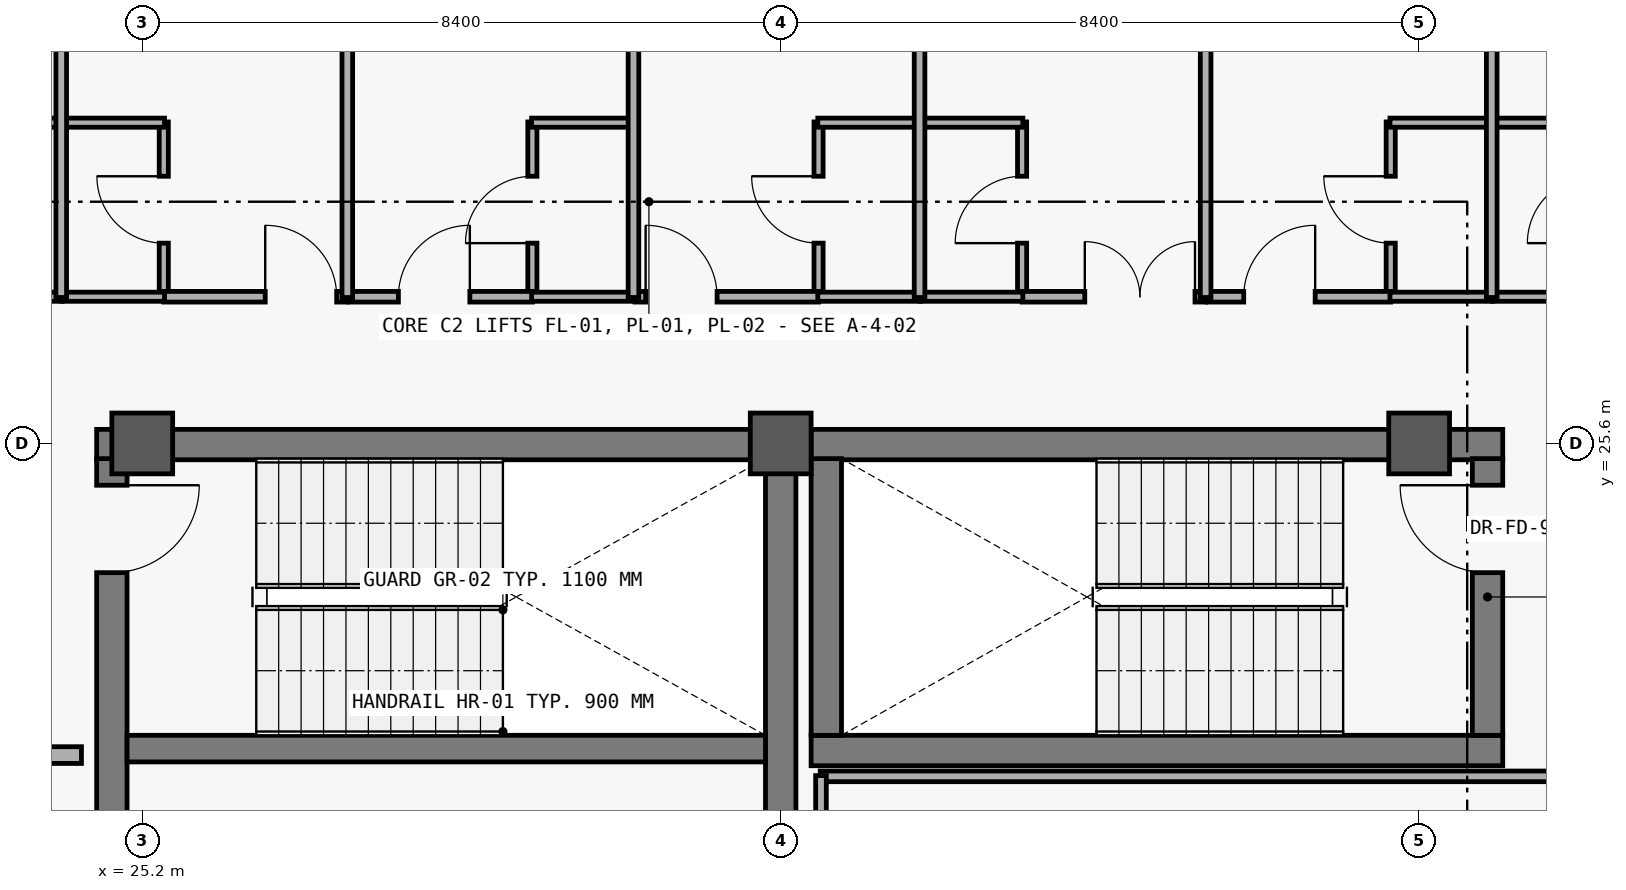
"""IFC4 building model, lengths in metres.
Left out: names, types, materials, properties, quantities, classifications, styles, units other than length and angle.
Written with IfcOpenShell. Run it as: python <this file> out.ifc"""

import sys

from ifc_helpers import new_model, si_unit, direction, frame, frame_2d, origin, origin_2d, place, context, subcontext, project, spatial, rectangle, extrude, element, fill, save


model = new_model("IFC4")
c1 = context("Model", 3, precision=1e-05, world=origin(), true_north=direction((0.0, 1.0)))
c2 = subcontext(c1, "Body", "Model", "MODEL_VIEW")
j1 = project(units=[si_unit("LENGTHUNIT", "METRE"), si_unit("PLANEANGLEUNIT", "RADIAN")], contexts=[c1])
p1 = place(None, origin())
s1 = spatial("IfcSite", under=j1, at=p1, CompositionType="ELEMENT")
p2 = place(p1, origin())
s2 = spatial("IfcBuilding", under=s1, at=p2, CompositionType="ELEMENT")
p3 = place(p2, frame((0.0, 0.0, 10.8)))
s3 = spatial("IfcBuildingStorey", under=s2, at=p3, CompositionType="ELEMENT", Elevation=10.8)
for number, where, z_axis, x_axis in (
    (1, (25.2, 25.6, 0.0), (0.0, 0.0, 1.0), (1.0, 0.0, 0.0)),
    (2, (33.6, 25.6, 0.0), (0.0, 0.0, 1.0), (1.0, 0.0, 0.0)),
    (3, (42.0, 25.6, 0.0), (0.0, 0.0, 1.0), (1.0, 0.0, 0.0)),
):
    element("IfcColumn", number, at=place(p3, frame(where, z_axis=z_axis, x_axis=x_axis)), inside=s3, PredefinedType="COLUMN", context=c2, shape_type="SweptSolid", body=[
        extrude(rectangle(XDim=0.8, YDim=0.8, at=origin_2d()), origin(), (0.0, 0.0, 1.0), 4.2),
    ])
p4 = place(p3, frame((33.8, 25.585, 0.0), z_axis=(0.0, 0.0, 1.0), x_axis=(-1.0, 0.0, 0.0)))
e4 = element("IfcWall", 4, at=p4, inside=s3, PredefinedType="SHEAR", context=c2, shape_type="SweptSolid", body=[
    extrude(rectangle(XDim=9.2, YDim=0.4, at=frame_2d((4.6, 0.0))), origin(), (0.0, 0.0, 1.0), 3.92),
])
p5 = place(p3, frame((24.8, 25.4, 0.0), z_axis=(0.0, 0.0, 1.0), x_axis=(0.0, -1.0, 0.0)))
e5 = element("IfcWall", 5, at=p5, inside=s3, PredefinedType="SHEAR", context=c2, shape_type="SweptSolid", body=[
    extrude(rectangle(XDim=7.4, YDim=0.4, at=frame_2d((3.7, 0.0))), origin(), (0.0, 0.0, 1.0), 3.92),
])
p6 = place(p5, frame((0.35, 0.0, 0.0)))
e6 = element("IfcOpeningElement", 6, at=p6, cuts=e5, PredefinedType="OPENING", context=c2, shape_type="SweptSolid", body=[
    extrude(rectangle(XDim=1.15, YDim=2.2, at=frame_2d((0.575, 1.1))), frame((0.0, 0.21, 0.0), z_axis=(0.0, -1.0, 0.0), x_axis=(1.0, 0.0, 0.0)), (0.0, 0.0, 1.0), 0.42),
])
p7 = place(p3, frame((33.6, 18.0, 0.0), z_axis=(0.0, 0.0, 1.0), x_axis=(0.0, 1.0, 0.0)))
e7 = element("IfcWall", 7, at=p7, inside=s3, PredefinedType="SHEAR", context=c2, shape_type="SweptSolid", body=[
    extrude(rectangle(XDim=7.4, YDim=0.4, at=frame_2d((3.7, 0.0))), origin(), (0.0, 0.0, 1.0), 3.92),
])
p8 = place(p3, frame((25.0, 21.585, 0.0), z_axis=(0.0, 0.0, 1.0), x_axis=(1.0, 0.0, 0.0)))
e8 = element("IfcWall", 8, at=p8, inside=s3, PredefinedType="SHEAR", context=c2, shape_type="SweptSolid", body=[
    extrude(rectangle(XDim=8.4, YDim=0.35, at=frame_2d((4.2, 0.0))), origin(), (0.0, 0.0, 1.0), 3.92),
])
p9 = place(p3, frame((19.6, 21.5, 0.0), z_axis=(0.0, 0.0, 1.0), x_axis=(1.0, 0.0, 0.0)))
e9 = element("IfcWall", 9, at=p9, inside=s3, PredefinedType="SOLIDWALL", context=c2, shape_type="SweptSolid", body=[
    extrude(rectangle(XDim=4.8, YDim=0.22, at=frame_2d((2.4, 0.0))), origin(), (0.0, 0.0, 1.0), 3.07),
])
p10 = place(p9, frame((2.05, 0.0, 0.0)))
e10 = element("IfcOpeningElement", 10, at=p10, cuts=e9, PredefinedType="OPENING", context=c2, shape_type="SweptSolid", body=[
    extrude(rectangle(XDim=1.25, YDim=2.2, at=frame_2d((0.625, 1.1))), frame((0.0, 0.12, 0.0), z_axis=(0.0, -1.0, 0.0), x_axis=(1.0, 0.0, 0.0)), (0.0, 0.0, 1.0), 0.24),
])
for number, where, z_axis, x_axis in (
    (11, (34.0, 21.56, 0.0), (0.0, 0.0, 1.0), (1.0, 0.0, 0.0)),
    (12, (43.1, 25.585, 0.0), (0.0, 0.0, 1.0), (-1.0, 0.0, 0.0)),
):
    element("IfcWall", number, at=place(p3, frame(where, z_axis=z_axis, x_axis=x_axis)), inside=s3, PredefinedType="SHEAR", context=c2, shape_type="SweptSolid", body=[
        extrude(rectangle(XDim=9.1, YDim=0.4, at=frame_2d((4.55, 0.0))), origin(), (0.0, 0.0, 1.0), 3.92),
    ])
p11 = place(p3, frame((34.2, 25.4, 0.0), z_axis=(0.0, 0.0, 1.0), x_axis=(0.0, -1.0, 0.0)))
e13 = element("IfcWall", 13, at=p11, inside=s3, PredefinedType="SHEAR", context=c2, shape_type="SweptSolid", body=[
    extrude(rectangle(XDim=3.64, YDim=0.4, at=frame_2d((1.82, 0.0))), origin(), (0.0, 0.0, 1.0), 3.92),
])
p12 = place(p3, frame((42.9, 21.76, 0.0), z_axis=(0.0, 0.0, 1.0), x_axis=(0.0, 1.0, 0.0)))
e14 = element("IfcWall", 14, at=p12, inside=s3, PredefinedType="SHEAR", context=c2, shape_type="SweptSolid", body=[
    extrude(rectangle(XDim=3.64, YDim=0.4, at=frame_2d((1.82, 0.0))), origin(), (0.0, 0.0, 1.0), 3.92),
])
p13 = place(p12, frame((2.14, 0.0, 0.0)))
e15 = element("IfcOpeningElement", 15, at=p13, cuts=e14, PredefinedType="OPENING", context=c2, shape_type="SweptSolid", body=[
    extrude(rectangle(XDim=1.15, YDim=2.2, at=frame_2d((0.575, 1.1))), frame((0.0, 0.21, 0.0), z_axis=(0.0, -1.0, 0.0), x_axis=(1.0, 0.0, 0.0)), (0.0, 0.0, 1.0), 0.42),
])
p14 = place(p3, frame((25.483, 27.52, 0.0), z_axis=(0.0, 0.0, 1.0), x_axis=(0.0, 1.0, 0.0)))
e16 = element("IfcWall", 16, at=p14, inside=s3, PredefinedType="PARTITIONING", context=c2, shape_type="SweptSolid", body=[
    extrude(rectangle(XDim=2.31, YDim=0.12, at=frame_2d((1.155, 0.0))), origin(), (0.0, 0.0, 1.0), 3.02),
])
p15 = place(p14, frame((0.715, 0.0, 0.0)))
e17 = element("IfcOpeningElement", 17, at=p15, cuts=e16, PredefinedType="OPENING", context=c2, shape_type="SweptSolid", body=[
    extrude(rectangle(XDim=0.88, YDim=2.15, at=frame_2d((0.44, 1.075))), frame((0.0, 0.07, 0.0), z_axis=(0.0, -1.0, 0.0), x_axis=(1.0, 0.0, 0.0)), (0.0, 0.0, 1.0), 0.14),
])
p16 = place(p3, frame((30.333, 27.52, 0.0), z_axis=(0.0, 0.0, 1.0), x_axis=(0.0, 1.0, 0.0)))
e18 = element("IfcWall", 18, at=p16, inside=s3, PredefinedType="PARTITIONING", context=c2, shape_type="SweptSolid", body=[
    extrude(rectangle(XDim=2.31, YDim=0.12, at=frame_2d((1.155, 0.0))), origin(), (0.0, 0.0, 1.0), 3.02),
])
p17 = place(p16, frame((0.715, 0.0, 0.0)))
e19 = element("IfcOpeningElement", 19, at=p17, cuts=e18, PredefinedType="OPENING", context=c2, shape_type="SweptSolid", body=[
    extrude(rectangle(XDim=0.88, YDim=2.15, at=frame_2d((0.44, 1.075))), frame((0.0, 0.07, 0.0), z_axis=(0.0, -1.0, 0.0), x_axis=(1.0, 0.0, 0.0)), (0.0, 0.0, 1.0), 0.14),
])
p18 = place(p3, frame((34.098, 27.52, 0.0), z_axis=(0.0, 0.0, 1.0), x_axis=(0.0, 1.0, 0.0)))
e20 = element("IfcWall", 20, at=p18, inside=s3, PredefinedType="PARTITIONING", context=c2, shape_type="SweptSolid", body=[
    extrude(rectangle(XDim=2.31, YDim=0.12, at=frame_2d((1.155, 0.0))), origin(), (0.0, 0.0, 1.0), 3.02),
])
p19 = place(p18, frame((0.715, 0.0, 0.0)))
e21 = element("IfcOpeningElement", 21, at=p19, cuts=e20, PredefinedType="OPENING", context=c2, shape_type="SweptSolid", body=[
    extrude(rectangle(XDim=0.88, YDim=2.15, at=frame_2d((0.44, 1.075))), frame((0.0, 0.07, 0.0), z_axis=(0.0, -1.0, 0.0), x_axis=(1.0, 0.0, 0.0)), (0.0, 0.0, 1.0), 0.14),
])
p20 = place(p3, frame((36.776, 27.52, 0.0), z_axis=(0.0, 0.0, 1.0), x_axis=(0.0, 1.0, 0.0)))
e22 = element("IfcWall", 22, at=p20, inside=s3, PredefinedType="PARTITIONING", context=c2, shape_type="SweptSolid", body=[
    extrude(rectangle(XDim=2.31, YDim=0.12, at=frame_2d((1.155, 0.0))), origin(), (0.0, 0.0, 1.0), 3.02),
])
p21 = place(p20, frame((0.715, 0.0, 0.0)))
e23 = element("IfcOpeningElement", 23, at=p21, cuts=e22, PredefinedType="OPENING", context=c2, shape_type="SweptSolid", body=[
    extrude(rectangle(XDim=0.88, YDim=2.15, at=frame_2d((0.44, 1.075))), frame((0.0, 0.07, 0.0), z_axis=(0.0, -1.0, 0.0), x_axis=(1.0, 0.0, 0.0)), (0.0, 0.0, 1.0), 0.14),
])
p22 = place(p3, frame((41.626, 27.52, 0.0), z_axis=(0.0, 0.0, 1.0), x_axis=(0.0, 1.0, 0.0)))
e24 = element("IfcWall", 24, at=p22, inside=s3, PredefinedType="PARTITIONING", context=c2, shape_type="SweptSolid", body=[
    extrude(rectangle(XDim=2.31, YDim=0.12, at=frame_2d((1.155, 0.0))), origin(), (0.0, 0.0, 1.0), 3.02),
])
p23 = place(p22, frame((0.715, 0.0, 0.0)))
e25 = element("IfcOpeningElement", 25, at=p23, cuts=e24, PredefinedType="OPENING", context=c2, shape_type="SweptSolid", body=[
    extrude(rectangle(XDim=0.88, YDim=2.15, at=frame_2d((0.44, 1.075))), frame((0.0, 0.07, 0.0), z_axis=(0.0, -1.0, 0.0), x_axis=(1.0, 0.0, 0.0)), (0.0, 0.0, 1.0), 0.14),
])
p24 = place(p3, frame((25.483, 27.53, 0.0), z_axis=(0.0, 0.0, 1.0), x_axis=(1.0, 0.0, 0.0)))
e26 = element("IfcWall", 26, at=p24, inside=s3, PredefinedType="PARTITIONING", context=c2, shape_type="SweptSolid", body=[
    extrude(rectangle(XDim=2.415, YDim=0.14, at=frame_2d((1.208, 0.0))), origin(), (0.0, 0.0, 1.0), 3.02),
])
p25 = place(p24, frame((1.335, 0.0, 0.0)))
e27 = element("IfcOpeningElement", 27, at=p25, cuts=e26, PredefinedType="OPENING", context=c2, shape_type="SweptSolid", body=[
    extrude(rectangle(XDim=0.94, YDim=2.2, at=frame_2d((0.47, 1.1))), frame((0.0, 0.08, 0.0), z_axis=(0.0, -1.0, 0.0), x_axis=(1.0, 0.0, 0.0)), (0.0, 0.0, 1.0), 0.16),
])
p26 = place(p3, frame((27.918, 27.53, 0.0), z_axis=(0.0, 0.0, 1.0), x_axis=(1.0, 0.0, 0.0)))
e28 = element("IfcWall", 28, at=p26, inside=s3, PredefinedType="PARTITIONING", context=c2, shape_type="SweptSolid", body=[
    extrude(rectangle(XDim=2.415, YDim=0.14, at=frame_2d((1.208, 0.0))), origin(), (0.0, 0.0, 1.0), 3.02),
])
p27 = place(p26, frame((0.652, 0.0, 0.0)))
e29 = element("IfcOpeningElement", 29, at=p27, cuts=e28, PredefinedType="OPENING", context=c2, shape_type="SweptSolid", body=[
    extrude(rectangle(XDim=0.94, YDim=2.2, at=frame_2d((0.47, 1.1))), frame((0.0, 0.08, 0.0), z_axis=(0.0, -1.0, 0.0), x_axis=(1.0, 0.0, 0.0)), (0.0, 0.0, 1.0), 0.16),
])
p28 = place(p3, frame((31.683, 27.53, 0.0), z_axis=(0.0, 0.0, 1.0), x_axis=(1.0, 0.0, 0.0)))
e30 = element("IfcWall", 30, at=p28, inside=s3, PredefinedType="PARTITIONING", context=c2, shape_type="SweptSolid", body=[
    extrude(rectangle(XDim=2.415, YDim=0.14, at=frame_2d((1.208, 0.0))), origin(), (0.0, 0.0, 1.0), 3.02),
])
p29 = place(p28, frame((0.14, 0.0, 0.0)))
e31 = element("IfcOpeningElement", 31, at=p29, cuts=e30, PredefinedType="OPENING", context=c2, shape_type="SweptSolid", body=[
    extrude(rectangle(XDim=0.94, YDim=2.2, at=frame_2d((0.47, 1.1))), frame((0.0, 0.08, 0.0), z_axis=(0.0, -1.0, 0.0), x_axis=(1.0, 0.0, 0.0)), (0.0, 0.0, 1.0), 0.16),
])
p30 = place(p3, frame((36.776, 27.53, 0.0), z_axis=(0.0, 0.0, 1.0), x_axis=(1.0, 0.0, 0.0)))
e32 = element("IfcWall", 32, at=p30, inside=s3, PredefinedType="PARTITIONING", context=c2, shape_type="SweptSolid", body=[
    extrude(rectangle(XDim=2.415, YDim=0.14, at=frame_2d((1.208, 0.0))), origin(), (0.0, 0.0, 1.0), 3.02),
])
p31 = place(p30, frame((0.825, 0.0, 0.0)))
e33 = element("IfcOpeningElement", 33, at=p31, cuts=e32, PredefinedType="OPENING", context=c2, shape_type="SweptSolid", body=[
    extrude(rectangle(XDim=1.45, YDim=2.3, at=frame_2d((0.725, 1.15))), frame((0.0, 0.08, 0.0), z_axis=(0.0, -1.0, 0.0), x_axis=(1.0, 0.0, 0.0)), (0.0, 0.0, 1.0), 0.16),
])
p32 = place(p3, frame((39.211, 27.53, 0.0), z_axis=(0.0, 0.0, 1.0), x_axis=(1.0, 0.0, 0.0)))
e34 = element("IfcWall", 34, at=p32, inside=s3, PredefinedType="PARTITIONING", context=c2, shape_type="SweptSolid", body=[
    extrude(rectangle(XDim=2.415, YDim=0.14, at=frame_2d((1.208, 0.0))), origin(), (0.0, 0.0, 1.0), 3.02),
])
p33 = place(p32, frame((0.481, 0.0, 0.0)))
e35 = element("IfcOpeningElement", 35, at=p33, cuts=e34, PredefinedType="OPENING", context=c2, shape_type="SweptSolid", body=[
    extrude(rectangle(XDim=0.94, YDim=2.2, at=frame_2d((0.47, 1.1))), frame((0.0, 0.08, 0.0), z_axis=(0.0, -1.0, 0.0), x_axis=(1.0, 0.0, 0.0)), (0.0, 0.0, 1.0), 0.16),
])
for number, where, z_axis, x_axis in (
    (36, (22.795, 27.53, 0.0), (0.0, 0.0, 1.0), (1.0, 0.0, 0.0)),
    (37, (22.795, 29.82, 0.0), (0.0, 0.0, 1.0), (1.0, 0.0, 0.0)),
):
    element("IfcWall", number, at=place(p3, frame(where, z_axis=z_axis, x_axis=x_axis)), inside=s3, PredefinedType="PARTITIONING", context=c2, shape_type="SweptSolid", body=[
        extrude(rectangle(XDim=1.349, YDim=0.12, at=frame_2d((0.675, 0.0))), origin(), (0.0, 0.0, 1.0), 3.02),
    ])
for number, where, z_axis, x_axis in (
    (38, (24.144, 27.53, 0.0), (0.0, 0.0, 1.0), (1.0, 0.0, 0.0)),
    (39, (24.144, 29.82, 0.0), (0.0, 0.0, 1.0), (1.0, 0.0, 0.0)),
):
    element("IfcWall", number, at=place(p3, frame(where, z_axis=z_axis, x_axis=x_axis)), inside=s3, PredefinedType="PARTITIONING", context=c2, shape_type="SweptSolid", body=[
        extrude(rectangle(XDim=1.349, YDim=0.12, at=frame_2d((0.674, 0.0))), origin(), (0.0, 0.0, 1.0), 3.02),
    ])
for number, where, z_axis, x_axis in (
    (40, (30.323, 27.53, 0.0), (0.0, 0.0, 1.0), (1.0, 0.0, 0.0)),
    (41, (30.323, 29.82, 0.0), (0.0, 0.0, 1.0), (1.0, 0.0, 0.0)),
):
    element("IfcWall", number, at=place(p3, frame(where, z_axis=z_axis, x_axis=x_axis)), inside=s3, PredefinedType="PARTITIONING", context=c2, shape_type="SweptSolid", body=[
        extrude(rectangle(XDim=1.35, YDim=0.12, at=frame_2d((0.675, 0.0))), origin(), (0.0, 0.0, 1.0), 3.02),
    ])
for number, where, z_axis, x_axis in (
    (42, (34.088, 27.53, 0.0), (0.0, 0.0, 1.0), (1.0, 0.0, 0.0)),
    (43, (34.088, 29.82, 0.0), (0.0, 0.0, 1.0), (1.0, 0.0, 0.0)),
):
    element("IfcWall", number, at=place(p3, frame(where, z_axis=z_axis, x_axis=x_axis)), inside=s3, PredefinedType="PARTITIONING", context=c2, shape_type="SweptSolid", body=[
        extrude(rectangle(XDim=1.349, YDim=0.12, at=frame_2d((0.675, 0.0))), origin(), (0.0, 0.0, 1.0), 3.02),
    ])
for number, where, z_axis, x_axis in (
    (44, (35.437, 27.53, 0.0), (0.0, 0.0, 1.0), (1.0, 0.0, 0.0)),
    (45, (35.437, 29.82, 0.0), (0.0, 0.0, 1.0), (1.0, 0.0, 0.0)),
):
    element("IfcWall", number, at=place(p3, frame(where, z_axis=z_axis, x_axis=x_axis)), inside=s3, PredefinedType="PARTITIONING", context=c2, shape_type="SweptSolid", body=[
        extrude(rectangle(XDim=1.349, YDim=0.12, at=frame_2d((0.674, 0.0))), origin(), (0.0, 0.0, 1.0), 3.02),
    ])
for number, where, z_axis, x_axis in (
    (46, (41.616, 27.53, 0.0), (0.0, 0.0, 1.0), (1.0, 0.0, 0.0)),
    (47, (41.616, 29.82, 0.0), (0.0, 0.0, 1.0), (1.0, 0.0, 0.0)),
):
    element("IfcWall", number, at=place(p3, frame(where, z_axis=z_axis, x_axis=x_axis)), inside=s3, PredefinedType="PARTITIONING", context=c2, shape_type="SweptSolid", body=[
        extrude(rectangle(XDim=1.349, YDim=0.12, at=frame_2d((0.675, 0.0))), origin(), (0.0, 0.0, 1.0), 3.02),
    ])
for number, where, z_axis, x_axis in (
    (48, (42.965, 27.53, 0.0), (0.0, 0.0, 1.0), (1.0, 0.0, 0.0)),
    (49, (42.965, 29.82, 0.0), (0.0, 0.0, 1.0), (1.0, 0.0, 0.0)),
):
    element("IfcWall", number, at=place(p3, frame(where, z_axis=z_axis, x_axis=x_axis)), inside=s3, PredefinedType="PARTITIONING", context=c2, shape_type="SweptSolid", body=[
        extrude(rectangle(XDim=1.349, YDim=0.12, at=frame_2d((0.674, 0.0))), origin(), (0.0, 0.0, 1.0), 3.02),
    ])
p34 = place(p3, frame((34.12, 21.22, 0.0), z_axis=(0.0, 0.0, 1.0), x_axis=(1.0, 0.0, 0.0)))
e50 = element("IfcWall", 50, at=p34, inside=s3, PredefinedType="PARTITIONING", context=c2, shape_type="SweptSolid", body=[
    extrude(rectangle(XDim=10.76, YDim=0.14, at=frame_2d((5.38, 0.0))), origin(), (0.0, 0.0, 1.0), 3.02),
])
p35 = place(p3, frame((34.13, 17.77, 0.0), z_axis=(0.0, 0.0, 1.0), x_axis=(0.0, 1.0, 0.0)))
e51 = element("IfcWall", 51, at=p35, inside=s3, PredefinedType="PARTITIONING", context=c2, shape_type="SweptSolid", body=[
    extrude(rectangle(XDim=3.46, YDim=0.14, at=frame_2d((1.73, 0.0))), origin(), (0.0, 0.0, 1.0), 3.02),
])
for number, where, z_axis, x_axis in (
    (52, (24.134, 27.52, 0.0), (0.0, 0.0, 1.0), (0.0, 1.0, 0.0)),
    (53, (27.898, 27.52, 0.0), (0.0, 0.0, 1.0), (0.0, 1.0, 0.0)),
    (54, (31.663, 27.52, 0.0), (0.0, 0.0, 1.0), (0.0, 1.0, 0.0)),
    (55, (35.427, 27.52, 0.0), (0.0, 0.0, 1.0), (0.0, 1.0, 0.0)),
    (56, (39.191, 27.52, 0.0), (0.0, 0.0, 1.0), (0.0, 1.0, 0.0)),
    (57, (42.955, 27.52, 0.0), (0.0, 0.0, 1.0), (0.0, 1.0, 0.0)),
):
    element("IfcWall", number, at=place(p3, frame(where, z_axis=z_axis, x_axis=x_axis)), inside=s3, PredefinedType="PARTITIONING", context=c2, shape_type="SweptSolid", body=[
        extrude(rectangle(XDim=6.2, YDim=0.14, at=frame_2d((3.1, 0.0))), origin(), (0.0, 0.0, 1.0), 3.02),
    ])
p36 = place(p6, origin())
e58 = element("IfcDoor", 58, at=p36, inside=s3, OperationType="SINGLE_SWING_LEFT", PredefinedType="DOOR", context=c2, shape_type="SweptSolid", body=[
    extrude(rectangle(XDim=1.15, YDim=2.2, at=frame_2d((0.575, 1.1))), frame((0.0, 0.025, 0.0), z_axis=(0.0, -1.0, 0.0), x_axis=(1.0, 0.0, 0.0)), (0.0, 0.0, 1.0), 0.05),
])
fill(e6, e58)
p37 = place(p13, origin())
e59 = element("IfcDoor", 59, at=p37, inside=s3, OperationType="SINGLE_SWING_RIGHT", PredefinedType="DOOR", context=c2, shape_type="SweptSolid", body=[
    extrude(rectangle(XDim=1.15, YDim=2.2, at=frame_2d((0.575, 1.1))), frame((0.0, 0.025, 0.0), z_axis=(0.0, -1.0, 0.0), x_axis=(1.0, 0.0, 0.0)), (0.0, 0.0, 1.0), 0.05),
])
fill(e15, e59)
p38 = place(p15, origin())
e60 = element("IfcDoor", 60, at=p38, inside=s3, OperationType="SINGLE_SWING_RIGHT", PredefinedType="DOOR", context=c2, shape_type="SweptSolid", body=[
    extrude(rectangle(XDim=0.88, YDim=2.15, at=frame_2d((0.44, 1.075))), frame((0.0, 0.025, 0.0), z_axis=(0.0, -1.0, 0.0), x_axis=(1.0, 0.0, 0.0)), (0.0, 0.0, 1.0), 0.05),
])
fill(e17, e60)
p39 = place(p17, origin())
e61 = element("IfcDoor", 61, at=p39, inside=s3, OperationType="SINGLE_SWING_LEFT", PredefinedType="DOOR", context=c2, shape_type="SweptSolid", body=[
    extrude(rectangle(XDim=0.88, YDim=2.15, at=frame_2d((0.44, 1.075))), frame((0.0, 0.025, 0.0), z_axis=(0.0, -1.0, 0.0), x_axis=(1.0, 0.0, 0.0)), (0.0, 0.0, 1.0), 0.05),
])
fill(e19, e61)
p40 = place(p19, origin())
e62 = element("IfcDoor", 62, at=p40, inside=s3, OperationType="SINGLE_SWING_RIGHT", PredefinedType="DOOR", context=c2, shape_type="SweptSolid", body=[
    extrude(rectangle(XDim=0.88, YDim=2.15, at=frame_2d((0.44, 1.075))), frame((0.0, 0.025, 0.0), z_axis=(0.0, -1.0, 0.0), x_axis=(1.0, 0.0, 0.0)), (0.0, 0.0, 1.0), 0.05),
])
fill(e21, e62)
p41 = place(p21, origin())
e63 = element("IfcDoor", 63, at=p41, inside=s3, OperationType="SINGLE_SWING_LEFT", PredefinedType="DOOR", context=c2, shape_type="SweptSolid", body=[
    extrude(rectangle(XDim=0.88, YDim=2.15, at=frame_2d((0.44, 1.075))), frame((0.0, 0.025, 0.0), z_axis=(0.0, -1.0, 0.0), x_axis=(1.0, 0.0, 0.0)), (0.0, 0.0, 1.0), 0.05),
])
fill(e23, e63)
p42 = place(p23, origin())
e64 = element("IfcDoor", 64, at=p42, inside=s3, OperationType="SINGLE_SWING_RIGHT", PredefinedType="DOOR", context=c2, shape_type="SweptSolid", body=[
    extrude(rectangle(XDim=0.88, YDim=2.15, at=frame_2d((0.44, 1.075))), frame((0.0, 0.025, 0.0), z_axis=(0.0, -1.0, 0.0), x_axis=(1.0, 0.0, 0.0)), (0.0, 0.0, 1.0), 0.05),
])
fill(e25, e64)
p43 = place(p25, origin())
e65 = element("IfcDoor", 65, at=p43, inside=s3, OperationType="SINGLE_SWING_LEFT", PredefinedType="DOOR", context=c2, shape_type="SweptSolid", body=[
    extrude(rectangle(XDim=0.94, YDim=2.2, at=frame_2d((0.47, 1.1))), frame((0.0, 0.025, 0.0), z_axis=(0.0, -1.0, 0.0), x_axis=(1.0, 0.0, 0.0)), (0.0, 0.0, 1.0), 0.05),
])
fill(e27, e65)
p44 = place(p27, origin())
e66 = element("IfcDoor", 66, at=p44, inside=s3, OperationType="SINGLE_SWING_RIGHT", PredefinedType="DOOR", context=c2, shape_type="SweptSolid", body=[
    extrude(rectangle(XDim=0.94, YDim=2.2, at=frame_2d((0.47, 1.1))), frame((0.0, 0.025, 0.0), z_axis=(0.0, -1.0, 0.0), x_axis=(1.0, 0.0, 0.0)), (0.0, 0.0, 1.0), 0.05),
])
fill(e29, e66)
p45 = place(p29, origin())
e67 = element("IfcDoor", 67, at=p45, inside=s3, OperationType="SINGLE_SWING_LEFT", PredefinedType="DOOR", context=c2, shape_type="SweptSolid", body=[
    extrude(rectangle(XDim=0.94, YDim=2.2, at=frame_2d((0.47, 1.1))), frame((0.0, 0.025, 0.0), z_axis=(0.0, -1.0, 0.0), x_axis=(1.0, 0.0, 0.0)), (0.0, 0.0, 1.0), 0.05),
])
fill(e31, e67)
p46 = place(p31, origin())
e68 = element("IfcDoor", 68, at=p46, inside=s3, OperationType="DOUBLE_DOOR_SINGLE_SWING", PredefinedType="DOOR", context=c2, shape_type="SweptSolid", body=[
    extrude(rectangle(XDim=1.45, YDim=2.3, at=frame_2d((0.725, 1.15))), frame((0.0, 0.025, 0.0), z_axis=(0.0, -1.0, 0.0), x_axis=(1.0, 0.0, 0.0)), (0.0, 0.0, 1.0), 0.05),
])
fill(e33, e68)
p47 = place(p33, origin())
e69 = element("IfcDoor", 69, at=p47, inside=s3, OperationType="SINGLE_SWING_RIGHT", PredefinedType="DOOR", context=c2, shape_type="SweptSolid", body=[
    extrude(rectangle(XDim=0.94, YDim=2.2, at=frame_2d((0.47, 1.1))), frame((0.0, 0.025, 0.0), z_axis=(0.0, -1.0, 0.0), x_axis=(1.0, 0.0, 0.0)), (0.0, 0.0, 1.0), 0.05),
])
fill(e35, e69)
save(model, sys.argv[1])
